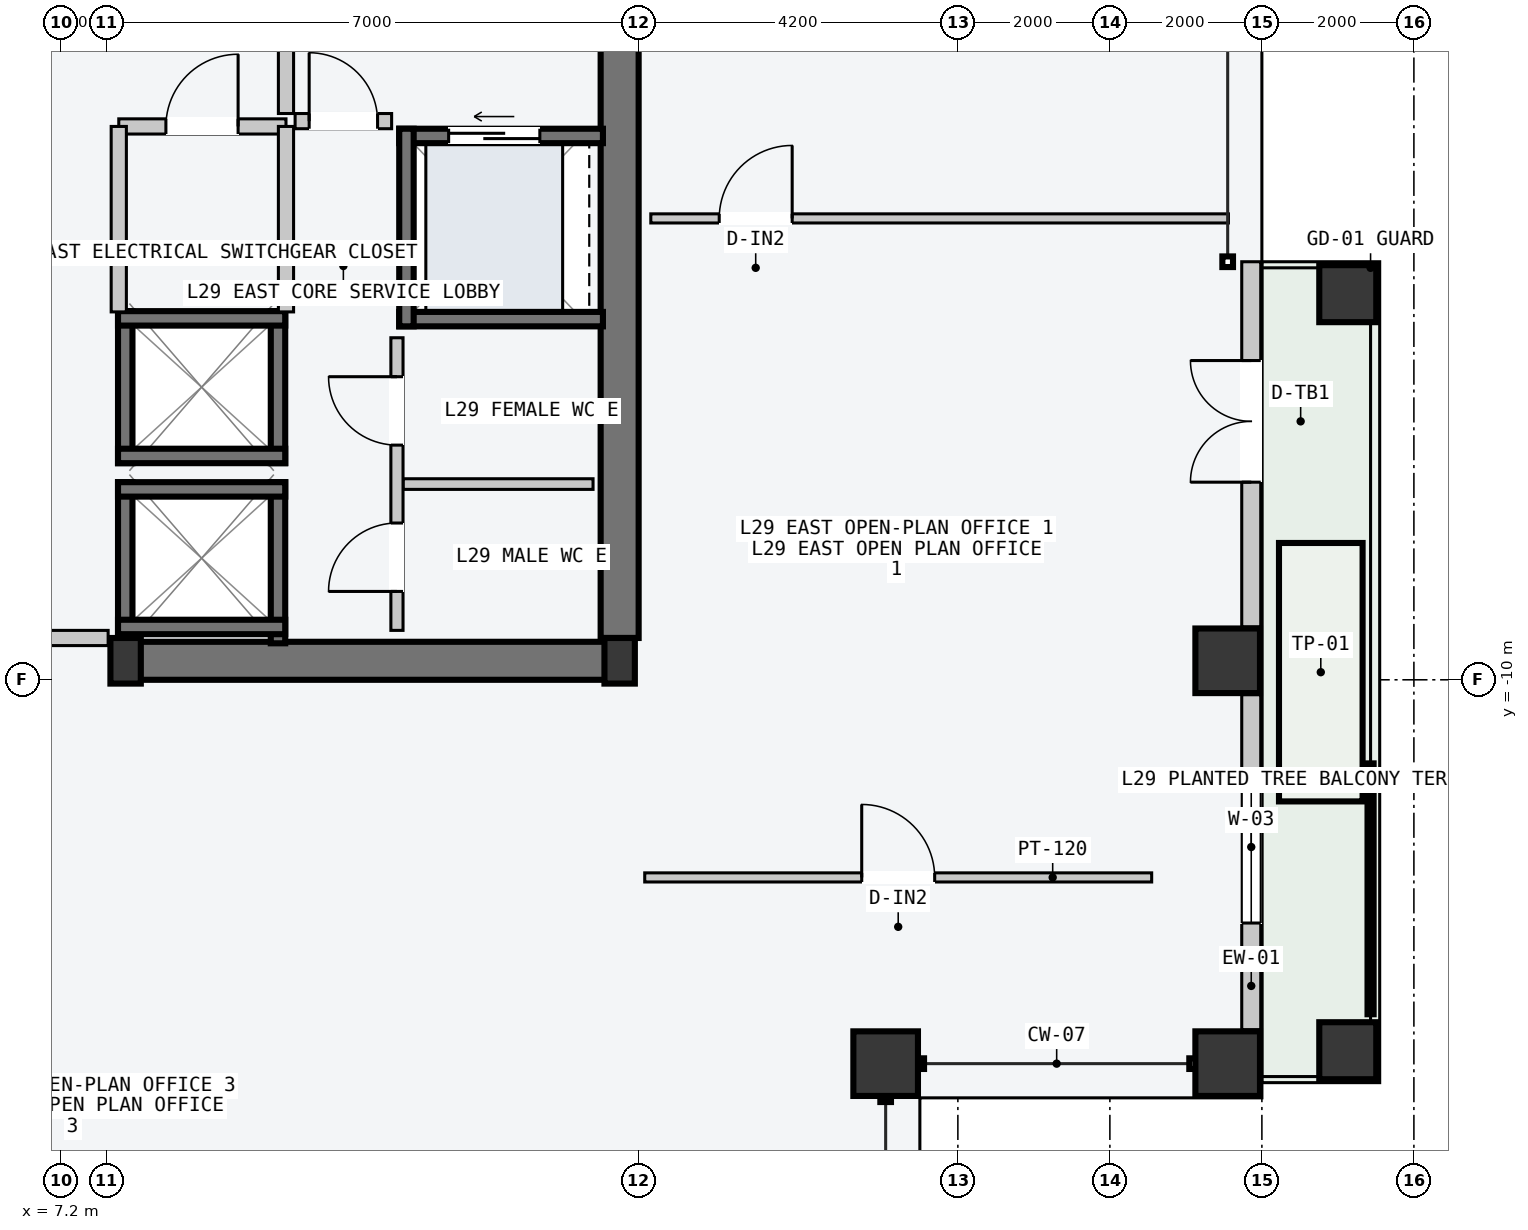
"""IFC4 building model, lengths in metres.
Left out: names, types, materials, properties, quantities, classifications, styles, units other than length and angle.
Written with IfcOpenShell. Run it as: python <this file> out.ifc"""

import sys

from ifc_helpers import new_model, si_unit, direction, frame, frame_2d, origin, origin_2d, place, context, subcontext, project, spatial, rectangle, hollow_rectangle, i_section, extrude, element, fill, save


model = new_model("IFC4")
c1 = context("Model", 3, precision=1e-05, world=origin(), true_north=direction((0.0, 1.0)))
c2 = subcontext(c1, "Body", "Model", "MODEL_VIEW")
j1 = project(units=[si_unit("LENGTHUNIT", "METRE"), si_unit("PLANEANGLEUNIT", "RADIAN")], contexts=[c1])
p1 = place(None, origin())
s1 = spatial("IfcSite", under=j1, at=p1, CompositionType="ELEMENT")
p2 = place(p1, origin())
s2 = spatial("IfcBuilding", under=s1, at=p2, CompositionType="ELEMENT")
p3 = place(p2, frame((0.0, 0.0, 113.4)))
s3 = spatial("IfcBuildingStorey", under=s2, at=p3, CompositionType="ELEMENT", Elevation=113.4)
p4 = place(p3, frame((8.07, -9.75, -0.2), z_axis=(0.0, 0.0, 1.0), x_axis=(1.0, 0.0, 0.0)))
e1 = element("IfcWall", 1, at=p4, inside=s3, PredefinedType="SHEAR", context=c2, shape_type="SweptSolid", body=[
    extrude(rectangle(XDim=6.46, YDim=0.5, at=frame_2d((3.23, 0.0))), origin(), (0.0, 0.0, 1.0), 3.6),
])
p5 = place(p3, frame((14.55, -9.45, -0.2), z_axis=(0.0, 0.0, 1.0), x_axis=(0.0, 1.0, 0.0)))
e2 = element("IfcWall", 2, at=p5, inside=s3, PredefinedType="SHEAR", context=c2, shape_type="SweptSolid", body=[
    extrude(rectangle(XDim=9.15, YDim=0.5, at=frame_2d((4.575, 0.0))), origin(), (0.0, 0.0, 1.0), 3.6),
])
for number, where, z_axis, x_axis in (
    (3, (8.05, -9.75, 0.0), (0.0, 0.0, 1.0), (1.0, 0.0, 0.0)),
    (4, (14.55, -9.75, 0.0), (0.0, 0.0, 1.0), (1.0, 0.0, 0.0)),
):
    element("IfcColumn", number, at=place(p3, frame(where, z_axis=z_axis, x_axis=x_axis)), inside=s3, PredefinedType="COLUMN", context=c2, shape_type="SweptSolid", body=[
        extrude(i_section(OverallWidth=0.4, OverallDepth=0.6, WebThickness=0.022, FlangeThickness=0.036, at=origin_2d()), origin(), (0.0, 0.0, 1.0), 3.6),
    ])
for number, where, z_axis, x_axis in (
    (5, (22.55, -15.05, 0.0), (0.0, 0.0, 1.0), (0.0, 1.0, 0.0)),
    (6, (22.55, -9.75, 0.0), (0.0, 0.0, 1.0), (0.0, 1.0, 0.0)),
    (7, (18.05, -15.05, 0.0), (0.0, 0.0, 1.0), (1.0, 0.0, 0.0)),
):
    element("IfcColumn", number, at=place(p3, frame(where, z_axis=z_axis, x_axis=x_axis)), inside=s3, PredefinedType="COLUMN", context=c2, shape_type="SweptSolid", body=[
        extrude(hollow_rectangle(XDim=0.85, YDim=0.85, WallThickness=0.04, at=origin_2d()), origin(), (0.0, 0.0, 1.0), 3.6),
    ])
for number, where, z_axis, x_axis in (
    (8, (24.13, -14.88, 0.0), (0.0, 0.0, 1.0), (0.0, 1.0, 0.0)),
    (9, (24.13, -4.92, 0.0), (0.0, 0.0, 1.0), (0.0, 1.0, 0.0)),
):
    element("IfcColumn", number, at=place(p3, frame(where, z_axis=z_axis, x_axis=x_axis)), inside=s3, PredefinedType="COLUMN", context=c2, shape_type="SweptSolid", body=[
        extrude(hollow_rectangle(XDim=0.75, YDim=0.75, WallThickness=0.032, at=origin_2d()), origin(), (0.0, 0.0, 1.0), 3.6),
    ])
p6 = place(p3, frame((22.86, -14.605, 0.0), z_axis=(0.0, 0.0, 1.0), x_axis=(0.0, 1.0, 0.0)))
e10 = element("IfcWall", 10, at=p6, inside=s3, PredefinedType="STANDARD", context=c2, shape_type="SweptSolid", body=[
    extrude(rectangle(XDim=4.41, YDim=0.25, at=frame_2d((2.205, 0.0))), origin(), (0.0, 0.0, 1.0), 3.4),
])
p7 = place(p6, frame((1.405, 0.0, 0.85)))
e11 = element("IfcOpeningElement", 11, at=p7, cuts=e10, PredefinedType="OPENING", context=c2, shape_type="SweptSolid", body=[
    extrude(rectangle(XDim=2.0, YDim=2.1, at=frame_2d((1.0, 1.05))), frame((0.0, 0.135, 0.0), z_axis=(0.0, -1.0, 0.0), x_axis=(1.0, 0.0, 0.0)), (0.0, 0.0, 1.0), 0.27),
])
p8 = place(p3, frame((22.86, -9.305, 0.0), z_axis=(0.0, 0.0, 1.0), x_axis=(0.0, 1.0, 0.0)))
e12 = element("IfcWall", 12, at=p8, inside=s3, PredefinedType="STANDARD", context=c2, shape_type="SweptSolid", body=[
    extrude(rectangle(XDim=4.805, YDim=0.25, at=frame_2d((2.402, 0.0))), origin(), (0.0, 0.0, 1.0), 3.4),
])
p9 = place(p8, frame((1.905, 0.0, 0.0)))
e13 = element("IfcOpeningElement", 13, at=p9, cuts=e12, PredefinedType="OPENING", context=c2, shape_type="SweptSolid", body=[
    extrude(rectangle(XDim=1.6, YDim=2.2, at=frame_2d((0.8, 1.1))), frame((0.0, 0.135, 0.0), z_axis=(0.0, -1.0, 0.0), x_axis=(1.0, 0.0, 0.0)), (0.0, 0.0, 1.0), 0.27),
])
for number, where, z_axis, x_axis in (
    (14, (8.045, -9.52, -0.2), (0.0, 0.0, 1.0), (0.0, 1.0, 0.0)),
    (15, (10.055, -9.52, -0.2), (0.0, 0.0, 1.0), (0.0, 1.0, 0.0)),
):
    element("IfcWall", number, at=place(p3, frame(where, z_axis=z_axis, x_axis=x_axis)), inside=s3, PredefinedType="SOLIDWALL", context=c2, shape_type="SweptSolid", body=[
        extrude(rectangle(XDim=2.12, YDim=0.19, at=frame_2d((1.06, 0.0))), origin(), (0.0, 0.0, 1.0), 3.6),
    ])
for number, where, z_axis, x_axis in (
    (16, (7.95, -7.495, -0.2), (0.0, 0.0, 1.0), (1.0, 0.0, 0.0)),
    (17, (7.95, -9.305, -0.2), (0.0, 0.0, 1.0), (1.0, 0.0, 0.0)),
):
    element("IfcWall", number, at=place(p3, frame(where, z_axis=z_axis, x_axis=x_axis)), inside=s3, PredefinedType="SOLIDWALL", context=c2, shape_type="SweptSolid", body=[
        extrude(rectangle(XDim=2.2, YDim=0.19, at=frame_2d((1.1, 0.0))), origin(), (0.0, 0.0, 1.0), 3.6),
    ])
for number, where, z_axis, x_axis in (
    (18, (8.045, -7.15, -0.2), (0.0, 0.0, 1.0), (0.0, 1.0, 0.0)),
    (19, (10.055, -7.15, -0.2), (0.0, 0.0, 1.0), (0.0, 1.0, 0.0)),
):
    element("IfcWall", number, at=place(p3, frame(where, z_axis=z_axis, x_axis=x_axis)), inside=s3, PredefinedType="SOLIDWALL", context=c2, shape_type="SweptSolid", body=[
        extrude(rectangle(XDim=2.0, YDim=0.19, at=frame_2d((1.0, 0.0))), origin(), (0.0, 0.0, 1.0), 3.6),
    ])
for number, where, z_axis, x_axis in (
    (20, (7.95, -5.245, -0.2), (0.0, 0.0, 1.0), (1.0, 0.0, 0.0)),
    (21, (7.95, -7.055, -0.2), (0.0, 0.0, 1.0), (1.0, 0.0, 0.0)),
):
    element("IfcWall", number, at=place(p3, frame(where, z_axis=z_axis, x_axis=x_axis)), inside=s3, PredefinedType="SOLIDWALL", context=c2, shape_type="SweptSolid", body=[
        extrude(rectangle(XDim=2.2, YDim=0.19, at=frame_2d((1.1, 0.0))), origin(), (0.0, 0.0, 1.0), 3.6),
    ])
p10 = place(p3, frame((11.65, -2.845, -0.2), z_axis=(0.0, 0.0, 1.0), x_axis=(1.0, 0.0, 0.0)))
e22 = element("IfcWall", 22, at=p10, inside=s3, PredefinedType="SOLIDWALL", context=c2, shape_type="SweptSolid", body=[
    extrude(rectangle(XDim=2.68, YDim=0.19, at=frame_2d((1.34, 0.0))), origin(), (0.0, 0.0, 1.0), 3.6),
])
p11 = place(p10, frame((0.65, 0.0, 0.2)))
e23 = element("IfcOpeningElement", 23, at=p11, cuts=e22, PredefinedType="OPENING", context=c2, shape_type="SweptSolid", body=[
    extrude(rectangle(XDim=1.2, YDim=2.2, at=frame_2d((0.6, 1.1))), frame((0.0, 0.105, 0.0), z_axis=(0.0, -1.0, 0.0), x_axis=(1.0, 0.0, 0.0)), (0.0, 0.0, 1.0), 0.21),
])
p12 = place(p3, frame((11.65, -5.255, -0.2), z_axis=(0.0, 0.0, 1.0), x_axis=(1.0, 0.0, 0.0)))
e24 = element("IfcWall", 24, at=p12, inside=s3, PredefinedType="SOLIDWALL", context=c2, shape_type="SweptSolid", body=[
    extrude(rectangle(XDim=2.68, YDim=0.19, at=frame_2d((1.34, 0.0))), origin(), (0.0, 0.0, 1.0), 3.6),
])
p13 = place(p3, frame((11.745, -5.35, -0.2), z_axis=(0.0, 0.0, 1.0), x_axis=(0.0, 1.0, 0.0)))
e25 = element("IfcWall", 25, at=p13, inside=s3, PredefinedType="SOLIDWALL", context=c2, shape_type="SweptSolid", body=[
    extrude(rectangle(XDim=2.6, YDim=0.19, at=frame_2d((1.3, 0.0))), origin(), (0.0, 0.0, 1.0), 3.6),
])
p14 = place(p3, frame((6.02, -9.45, 0.0), z_axis=(0.0, 0.0, 1.0), x_axis=(1.0, 0.0, 0.0)))
e26 = element("IfcWall", 26, at=p14, inside=s3, PredefinedType="PARTITIONING", context=c2, shape_type="SweptSolid", body=[
    extrude(rectangle(XDim=1.8, YDim=0.2, at=frame_2d((0.9, 0.0))), origin(), (0.0, 0.0, 1.0), 3.4),
])
p15 = place(p3, frame((10.16, -2.55, 0.0), z_axis=(0.0, 0.0, 1.0), x_axis=(0.0, 1.0, 0.0)))
e27 = element("IfcWall", 27, at=p15, inside=s3, PredefinedType="PARTITIONING", context=c2, shape_type="SweptSolid", body=[
    extrude(rectangle(XDim=3.4, YDim=0.2, at=frame_2d((1.7, 0.0))), origin(), (0.0, 0.0, 1.0), 3.4),
])
p16 = place(p15, frame((1.3, 0.0, 0.0)))
e28 = element("IfcOpeningElement", 28, at=p16, cuts=e27, PredefinedType="OPENING", context=c2, shape_type="SweptSolid", body=[
    extrude(rectangle(XDim=1.1, YDim=2.15, at=frame_2d((0.55, 1.075))), frame((0.0, 0.11, 0.0), z_axis=(0.0, -1.0, 0.0), x_axis=(1.0, 0.0, 0.0)), (0.0, 0.0, 1.0), 0.22),
])
p17 = place(p3, frame((10.28, -2.65, 0.0), z_axis=(0.0, 0.0, 1.0), x_axis=(1.0, 0.0, 0.0)))
e29 = element("IfcWall", 29, at=p17, inside=s3, PredefinedType="PARTITIONING", context=c2, shape_type="SweptSolid", body=[
    extrude(rectangle(XDim=1.27, YDim=0.2, at=frame_2d((0.635, 0.0))), origin(), (0.0, 0.0, 1.0), 3.4),
])
p18 = place(p17, frame((0.185, 0.0, 0.0)))
e30 = element("IfcOpeningElement", 30, at=p18, cuts=e29, PredefinedType="OPENING", context=c2, shape_type="SweptSolid", body=[
    extrude(rectangle(XDim=0.9, YDim=2.15, at=frame_2d((0.45, 1.075))), frame((0.0, 0.11, 0.0), z_axis=(0.0, -1.0, 0.0), x_axis=(1.0, 0.0, 0.0)), (0.0, 0.0, 1.0), 0.22),
])
p19 = place(p3, frame((7.96, -2.72, 0.0), z_axis=(0.0, 0.0, 1.0), x_axis=(1.0, 0.0, 0.0)))
e31 = element("IfcWall", 31, at=p19, inside=s3, PredefinedType="PARTITIONING", context=c2, shape_type="SweptSolid", body=[
    extrude(rectangle(XDim=2.2, YDim=0.2, at=frame_2d((1.1, 0.0))), origin(), (0.0, 0.0, 1.0), 3.4),
])
p20 = place(p19, frame((0.62, 0.0, 0.0)))
e32 = element("IfcOpeningElement", 32, at=p20, cuts=e31, PredefinedType="OPENING", context=c2, shape_type="SweptSolid", body=[
    extrude(rectangle(XDim=0.95, YDim=2.1, at=frame_2d((0.475, 1.05))), frame((0.0, 0.11, 0.0), z_axis=(0.0, -1.0, 0.0), x_axis=(1.0, 0.0, 0.0)), (0.0, 0.0, 1.0), 0.22),
])
for number, where, z_axis, x_axis in (
    (33, (7.96, -5.16, 0.0), (0.0, 0.0, 1.0), (0.0, 1.0, 0.0)),
    (34, (10.16, -5.16, 0.0), (0.0, 0.0, 1.0), (0.0, 1.0, 0.0)),
):
    element("IfcWall", number, at=place(p3, frame(where, z_axis=z_axis, x_axis=x_axis)), inside=s3, PredefinedType="PARTITIONING", context=c2, shape_type="SweptSolid", body=[
        extrude(rectangle(XDim=2.44, YDim=0.2, at=frame_2d((1.22, 0.0))), origin(), (0.0, 0.0, 1.0), 3.4),
    ])
p21 = place(p3, frame((11.7, -7.425, 0.0), z_axis=(0.0, 0.0, 1.0), x_axis=(1.0, 0.0, 0.0)))
e35 = element("IfcWall", 35, at=p21, inside=s3, PredefinedType="PARTITIONING", context=c2, shape_type="SweptSolid", body=[
    extrude(rectangle(XDim=2.5, YDim=0.14, at=frame_2d((1.25, 0.0))), origin(), (0.0, 0.0, 1.0), 3.4),
])
p22 = place(p3, frame((11.62, -9.35, 0.0), z_axis=(0.0, 0.0, 1.0), x_axis=(0.0, 1.0, 0.0)))
e36 = element("IfcWall", 36, at=p22, inside=s3, PredefinedType="PARTITIONING", context=c2, shape_type="SweptSolid", body=[
    extrude(rectangle(XDim=3.85, YDim=0.16, at=frame_2d((1.925, 0.0))), origin(), (0.0, 0.0, 1.0), 3.4),
])
p23 = place(p22, frame((0.512, 0.0, 0.0)))
e37 = element("IfcOpeningElement", 37, at=p23, cuts=e36, PredefinedType="OPENING", context=c2, shape_type="SweptSolid", body=[
    extrude(rectangle(XDim=0.9, YDim=2.15, at=frame_2d((0.45, 1.075))), frame((0.0, 0.09, 0.0), z_axis=(0.0, -1.0, 0.0), x_axis=(1.0, 0.0, 0.0)), (0.0, 0.0, 1.0), 0.18),
])
p24 = place(p22, frame((2.438, 0.0, 0.0)))
e38 = element("IfcOpeningElement", 38, at=p24, cuts=e36, PredefinedType="OPENING", context=c2, shape_type="SweptSolid", body=[
    extrude(rectangle(XDim=0.9, YDim=2.15, at=frame_2d((0.45, 1.075))), frame((0.0, 0.09, 0.0), z_axis=(0.0, -1.0, 0.0), x_axis=(1.0, 0.0, 0.0)), (0.0, 0.0, 1.0), 0.18),
])
p25 = place(p3, frame((14.88, -12.6, 0.0), z_axis=(0.0, 0.0, 1.0), x_axis=(1.0, 0.0, 0.0)))
e39 = element("IfcWall", 39, at=p25, inside=s3, PredefinedType="PARTITIONING", context=c2, shape_type="SweptSolid", body=[
    extrude(rectangle(XDim=6.67, YDim=0.12, at=frame_2d((3.335, 0.0))), origin(), (0.0, 0.0, 1.0), 3.4),
])
p26 = place(p25, frame((2.855, 0.0, 0.0)))
e40 = element("IfcOpeningElement", 40, at=p26, cuts=e39, PredefinedType="OPENING", context=c2, shape_type="SweptSolid", body=[
    extrude(rectangle(XDim=0.96, YDim=2.18, at=frame_2d((0.48, 1.09))), frame((0.0, 0.07, 0.0), z_axis=(0.0, -1.0, 0.0), x_axis=(1.0, 0.0, 0.0)), (0.0, 0.0, 1.0), 0.14),
])
p27 = place(p3, frame((14.96, -3.93, 0.0), z_axis=(0.0, 0.0, 1.0), x_axis=(1.0, 0.0, 0.0)))
e41 = element("IfcWall", 41, at=p27, inside=s3, PredefinedType="PARTITIONING", context=c2, shape_type="SweptSolid", body=[
    extrude(rectangle(XDim=7.6, YDim=0.12, at=frame_2d((3.8, 0.0))), origin(), (0.0, 0.0, 1.0), 3.4),
])
p28 = place(p27, frame((0.9, 0.0, 0.0)))
e42 = element("IfcOpeningElement", 42, at=p28, cuts=e41, PredefinedType="OPENING", context=c2, shape_type="SweptSolid", body=[
    extrude(rectangle(XDim=0.96, YDim=2.18, at=frame_2d((0.48, 1.09))), frame((0.0, 0.07, 0.0), z_axis=(0.0, -1.0, 0.0), x_axis=(1.0, 0.0, 0.0)), (0.0, 0.0, 1.0), 0.14),
])
p29 = place(p7, origin())
e43 = element("IfcWindow", 43, at=p29, inside=s3, PartitioningType="SINGLE_PANEL", PredefinedType="WINDOW", context=c2, shape_type="SweptSolid", body=[
    extrude(rectangle(XDim=2.0, YDim=2.1, at=frame_2d((1.0, 1.05))), frame((0.0, 0.03, 0.0), z_axis=(0.0, -1.0, 0.0), x_axis=(1.0, 0.0, 0.0)), (0.0, 0.0, 1.0), 0.06),
])
fill(e11, e43)
p30 = place(p9, origin())
e44 = element("IfcDoor", 44, at=p30, inside=s3, OperationType="DOUBLE_DOOR_SINGLE_SWING", PredefinedType="DOOR", context=c2, shape_type="SweptSolid", body=[
    extrude(rectangle(XDim=1.6, YDim=2.2, at=frame_2d((0.8, 1.1))), frame((0.0, 0.025, 0.0), z_axis=(0.0, -1.0, 0.0), x_axis=(1.0, 0.0, 0.0)), (0.0, 0.0, 1.0), 0.05),
])
fill(e13, e44)
p31 = place(p11, origin())
e45 = element("IfcDoor", 45, at=p31, inside=s3, OperationType="SLIDING_TO_LEFT", PredefinedType="DOOR", context=c2, shape_type="SweptSolid", body=[
    extrude(rectangle(XDim=1.2, YDim=2.2, at=frame_2d((0.6, 1.1))), frame((0.0, 0.025, 0.0), z_axis=(0.0, -1.0, 0.0), x_axis=(1.0, 0.0, 0.0)), (0.0, 0.0, 1.0), 0.05),
])
fill(e23, e45)
p32 = place(p18, origin())
e46 = element("IfcDoor", 46, at=p32, inside=s3, OperationType="SINGLE_SWING_LEFT", PredefinedType="DOOR", context=c2, shape_type="SweptSolid", body=[
    extrude(rectangle(XDim=0.9, YDim=2.15, at=frame_2d((0.45, 1.075))), frame((0.0, 0.025, 0.0), z_axis=(0.0, -1.0, 0.0), x_axis=(1.0, 0.0, 0.0)), (0.0, 0.0, 1.0), 0.05),
])
fill(e30, e46)
p33 = place(p20, origin())
e47 = element("IfcDoor", 47, at=p33, inside=s3, OperationType="SINGLE_SWING_RIGHT", PredefinedType="DOOR", context=c2, shape_type="SweptSolid", body=[
    extrude(rectangle(XDim=0.95, YDim=2.1, at=frame_2d((0.475, 1.05))), frame((0.0, 0.025, 0.0), z_axis=(0.0, -1.0, 0.0), x_axis=(1.0, 0.0, 0.0)), (0.0, 0.0, 1.0), 0.05),
])
fill(e32, e47)
p34 = place(p23, origin())
e48 = element("IfcDoor", 48, at=p34, inside=s3, OperationType="SINGLE_SWING_LEFT", PredefinedType="DOOR", context=c2, shape_type="SweptSolid", body=[
    extrude(rectangle(XDim=0.9, YDim=2.15, at=frame_2d((0.45, 1.075))), frame((0.0, 0.025, 0.0), z_axis=(0.0, -1.0, 0.0), x_axis=(1.0, 0.0, 0.0)), (0.0, 0.0, 1.0), 0.05),
])
fill(e37, e48)
p35 = place(p24, origin())
e49 = element("IfcDoor", 49, at=p35, inside=s3, OperationType="SINGLE_SWING_RIGHT", PredefinedType="DOOR", context=c2, shape_type="SweptSolid", body=[
    extrude(rectangle(XDim=0.9, YDim=2.15, at=frame_2d((0.45, 1.075))), frame((0.0, 0.025, 0.0), z_axis=(0.0, -1.0, 0.0), x_axis=(1.0, 0.0, 0.0)), (0.0, 0.0, 1.0), 0.05),
])
fill(e38, e49)
p36 = place(p26, origin())
e50 = element("IfcDoor", 50, at=p36, inside=s3, OperationType="SINGLE_SWING_LEFT", PredefinedType="DOOR", context=c2, shape_type="SweptSolid", body=[
    extrude(rectangle(XDim=0.96, YDim=2.18, at=frame_2d((0.48, 1.09))), frame((0.0, 0.025, 0.0), z_axis=(0.0, -1.0, 0.0), x_axis=(1.0, 0.0, 0.0)), (0.0, 0.0, 1.0), 0.05),
])
fill(e40, e50)
p37 = place(p28, origin())
e51 = element("IfcDoor", 51, at=p37, inside=s3, OperationType="SINGLE_SWING_RIGHT", PredefinedType="DOOR", context=c2, shape_type="SweptSolid", body=[
    extrude(rectangle(XDim=0.96, YDim=2.18, at=frame_2d((0.48, 1.09))), frame((0.0, 0.025, 0.0), z_axis=(0.0, -1.0, 0.0), x_axis=(1.0, 0.0, 0.0)), (0.0, 0.0, 1.0), 0.05),
])
fill(e42, e51)
save(model, sys.argv[1])
